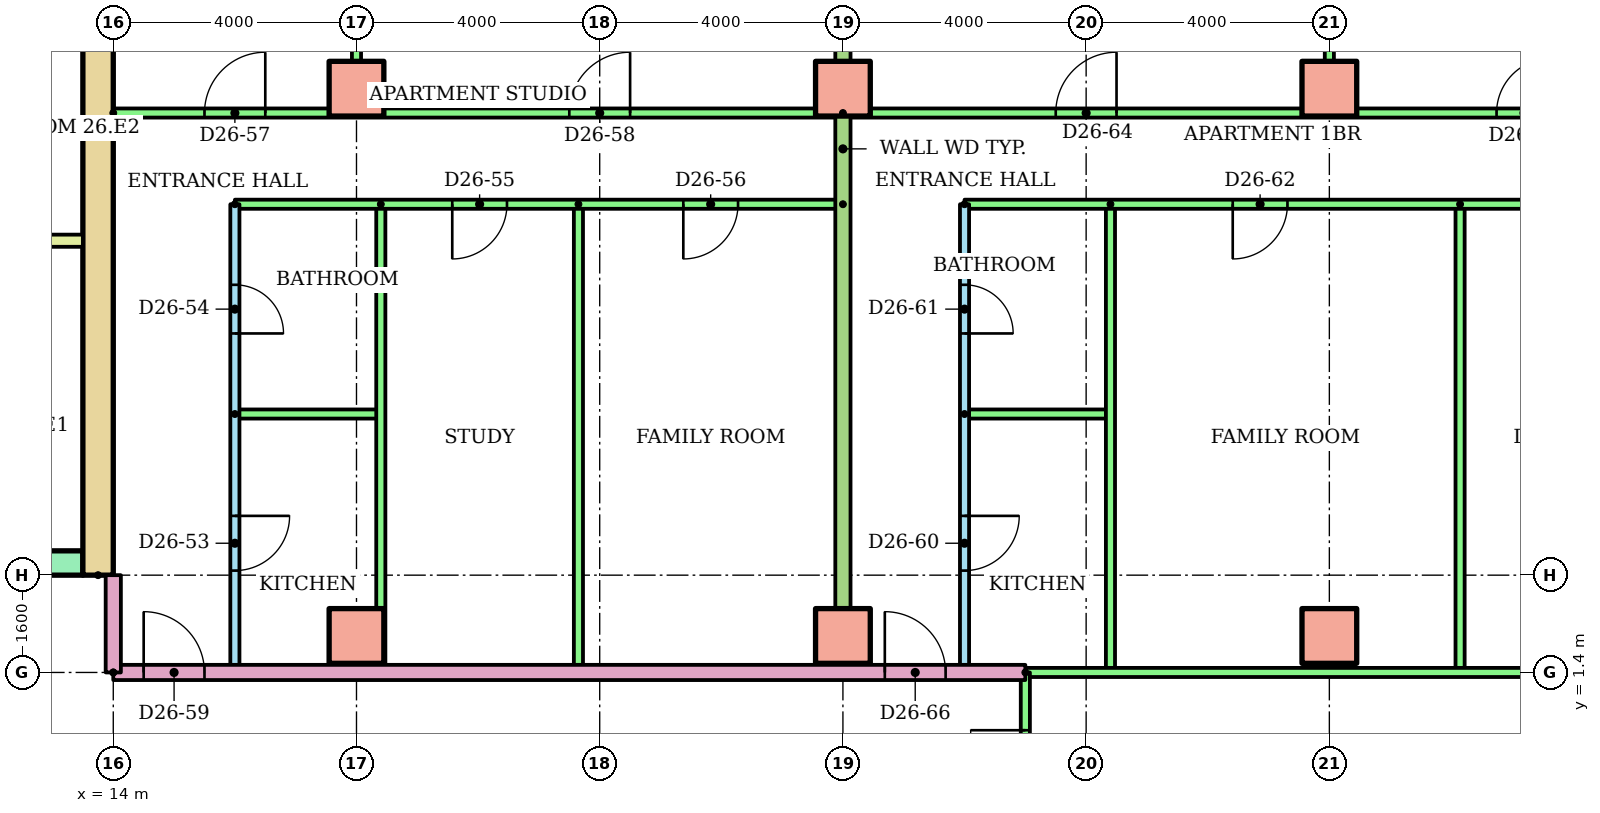
"""IFC4 building model, lengths in metres.
Left out: names, types, materials, properties, quantities, classifications, styles, units other than length and angle.
Written with IfcOpenShell. Run it as: python <this file> out.ifc"""

import sys

from ifc_helpers import new_model, si_unit, direction, frame, frame_2d, origin, origin_2d, place, context, subcontext, project, spatial, rectangle, extrude, element, fill, save


model = new_model("IFC4")
c1 = context("Model", 3, precision=1e-05, world=origin(), true_north=direction((0.0, 1.0)))
c2 = subcontext(c1, "Body", "Model", "MODEL_VIEW")
j1 = project(units=[si_unit("LENGTHUNIT", "METRE"), si_unit("PLANEANGLEUNIT", "RADIAN")], contexts=[c1])
p1 = place(None, origin())
s1 = spatial("IfcSite", under=j1, at=p1, CompositionType="ELEMENT")
p2 = place(p1, origin())
s2 = spatial("IfcBuilding", under=s1, at=p2, CompositionType="ELEMENT")
p3 = place(p2, frame((0.0, 0.0, 99.9)))
s3 = spatial("IfcBuildingStorey", under=s2, at=p3, CompositionType="ELEMENT", Elevation=99.9)
for number, where in (
    (1, (18.0, 2.0, 0.0)),
    (2, (26.0, 2.0, 0.0)),
    (3, (34.0, 2.0, 0.0)),
    (4, (18.0, 11.0, 0.0)),
    (5, (26.0, 11.0, 0.0)),
    (6, (34.0, 11.0, 0.0)),
):
    element("IfcColumn", number, at=place(p3, frame(where)), inside=s3, PredefinedType="COLUMN", context=c2, shape_type="SweptSolid", body=[
        extrude(rectangle(XDim=0.9, YDim=0.9, at=origin_2d()), origin(), (0.0, 0.0, 1.0), 3.2),
    ])
p4 = place(p3, frame((13.75, 3.0, 0.0), z_axis=(0.0, 0.0, 1.0), x_axis=(0.0, 1.0, 0.0)))
e7 = element("IfcWall", 7, at=p4, inside=s3, PredefinedType="SHEAR", context=c2, shape_type="SweptSolid", body=[
    extrude(rectangle(XDim=17.0, YDim=0.5, at=frame_2d((8.5, 0.0))), origin(), (0.0, 0.0, 1.0), 2.92),
])
p5 = place(p3, frame((-13.5, 3.2, 0.0)))
e8 = element("IfcWall", 8, at=p5, inside=s3, PredefinedType="SHEAR", context=c2, shape_type="SweptSolid", body=[
    extrude(rectangle(XDim=27.0, YDim=0.4, at=frame_2d((13.5, 0.0))), origin(), (0.0, 0.0, 1.0), 2.92),
])
p6 = place(p5, frame((6.861, 0.0, 0.0)))
e9 = element("IfcOpeningElement", 9, at=p6, cuts=e8, PredefinedType="OPENING", context=c2, shape_type="SweptSolid", body=[
    extrude(rectangle(XDim=1.1, YDim=2.1, at=frame_2d((0.55, 1.05))), frame((0.0, 0.21, 0.0), z_axis=(0.0, -1.0, 0.0), x_axis=(1.0, 0.0, 0.0)), (0.0, 0.0, 1.0), 0.42),
])
p7 = place(p5, frame((9.906, 0.0, 0.0)))
e10 = element("IfcOpeningElement", 10, at=p7, cuts=e8, PredefinedType="OPENING", context=c2, shape_type="SweptSolid", body=[
    extrude(rectangle(XDim=1.1, YDim=2.1, at=frame_2d((0.55, 1.05))), frame((0.0, 0.21, 0.0), z_axis=(0.0, -1.0, 0.0), x_axis=(1.0, 0.0, 0.0)), (0.0, 0.0, 1.0), 0.42),
])
p8 = place(p5, frame((15.994, 0.0, 0.0)))
e11 = element("IfcOpeningElement", 11, at=p8, cuts=e8, PredefinedType="OPENING", context=c2, shape_type="SweptSolid", body=[
    extrude(rectangle(XDim=1.1, YDim=2.1, at=frame_2d((0.55, 1.05))), frame((0.0, 0.21, 0.0), z_axis=(0.0, -1.0, 0.0), x_axis=(1.0, 0.0, 0.0)), (0.0, 0.0, 1.0), 0.42),
])
p9 = place(p5, frame((19.039, 0.0, 0.0)))
e12 = element("IfcOpeningElement", 12, at=p9, cuts=e8, PredefinedType="OPENING", context=c2, shape_type="SweptSolid", body=[
    extrude(rectangle(XDim=1.1, YDim=2.1, at=frame_2d((0.55, 1.05))), frame((0.0, 0.21, 0.0), z_axis=(0.0, -1.0, 0.0), x_axis=(1.0, 0.0, 0.0)), (0.0, 0.0, 1.0), 0.42),
])
p10 = place(p5, frame((12.6, 0.0, 0.0)))
e13 = element("IfcOpeningElement", 13, at=p10, cuts=e8, PredefinedType="OPENING", context=c2, shape_type="SweptSolid", body=[
    extrude(rectangle(XDim=1.8, YDim=2.1, at=frame_2d((0.9, 1.05))), frame((0.0, 0.21, 0.0), z_axis=(0.0, -1.0, 0.0), x_axis=(1.0, 0.0, 0.0)), (0.0, 0.0, 1.0), 0.42),
])
p11 = place(p3, frame((9.6, 8.5, 0.0)))
e14 = element("IfcWall", 14, at=p11, inside=s3, PredefinedType="PARTITIONING", context=c2, shape_type="SweptSolid", body=[
    extrude(rectangle(XDim=3.9, YDim=0.2, at=frame_2d((1.95, 0.0))), origin(), (0.0, 0.0, 1.0), 2.92),
])
p12 = place(p3, frame((16.0, 9.1, 0.0), z_axis=(0.0, 0.0, 1.0), x_axis=(0.0, -1.0, 0.0)))
e15 = element("IfcWall", 15, at=p12, inside=s3, PredefinedType="PARTITIONING", context=c2, shape_type="SweptSolid", body=[
    extrude(rectangle(XDim=7.7, YDim=0.15, at=frame_2d((3.85, 0.0))), origin(), (0.0, 0.0, 1.0), 2.4),
])
p13 = place(p12, frame((5.125, 0.0, 0.0)))
e16 = element("IfcOpeningElement", 16, at=p13, cuts=e15, PredefinedType="OPENING", context=c2, shape_type="SweptSolid", body=[
    extrude(rectangle(XDim=0.9, YDim=2.1, at=frame_2d((0.45, 1.05))), frame((0.0, 0.085, 0.0), z_axis=(0.0, -1.0, 0.0), x_axis=(1.0, 0.0, 0.0)), (0.0, 0.0, 1.0), 0.17),
])
p14 = place(p12, frame((1.325, 0.0, 0.0)))
e17 = element("IfcOpeningElement", 17, at=p14, cuts=e15, PredefinedType="OPENING", context=c2, shape_type="SweptSolid", body=[
    extrude(rectangle(XDim=0.8, YDim=2.1, at=frame_2d((0.4, 1.05))), frame((0.0, 0.085, 0.0), z_axis=(0.0, -1.0, 0.0), x_axis=(1.0, 0.0, 0.0)), (0.0, 0.0, 1.0), 0.17),
])
p15 = place(p3, frame((16.0, 5.65, 0.0)))
e18 = element("IfcWall", 18, at=p15, inside=s3, PredefinedType="PARTITIONING", context=c2, shape_type="SweptSolid", body=[
    extrude(rectangle(XDim=2.4, YDim=0.15, at=frame_2d((1.2, 0.0))), origin(), (0.0, 0.0, 1.0), 2.4),
])
for number, where, z_axis, x_axis in (
    (19, (18.4, 9.1, 0.0), (0.0, 0.0, 1.0), (0.0, -1.0, 0.0)),
    (20, (21.65, 9.1, 0.0), (0.0, 0.0, 1.0), (0.0, -1.0, 0.0)),
):
    element("IfcWall", number, at=place(p3, frame(where, z_axis=z_axis, x_axis=x_axis)), inside=s3, PredefinedType="PARTITIONING", context=c2, shape_type="SweptSolid", body=[
        extrude(rectangle(XDim=7.7, YDim=0.15, at=frame_2d((3.85, 0.0))), origin(), (0.0, 0.0, 1.0), 2.4),
    ])
p16 = place(p3, frame((26.0, 9.1, 0.0), z_axis=(0.0, 0.0, 1.0), x_axis=(-1.0, 0.0, 0.0)))
e21 = element("IfcWall", 21, at=p16, inside=s3, PredefinedType="PARTITIONING", context=c2, shape_type="SweptSolid", body=[
    extrude(rectangle(XDim=10.0, YDim=0.15, at=frame_2d((5.0, 0.0))), origin(), (0.0, 0.0, 1.0), 2.4),
])
p17 = place(p16, frame((5.525, 0.0, 0.0)))
e22 = element("IfcOpeningElement", 22, at=p17, cuts=e21, PredefinedType="OPENING", context=c2, shape_type="SweptSolid", body=[
    extrude(rectangle(XDim=0.9, YDim=2.1, at=frame_2d((0.45, 1.05))), frame((0.0, 0.085, 0.0), z_axis=(0.0, -1.0, 0.0), x_axis=(1.0, 0.0, 0.0)), (0.0, 0.0, 1.0), 0.17),
])
p18 = place(p16, frame((1.725, 0.0, 0.0)))
e23 = element("IfcOpeningElement", 23, at=p18, cuts=e21, PredefinedType="OPENING", context=c2, shape_type="SweptSolid", body=[
    extrude(rectangle(XDim=0.9, YDim=2.1, at=frame_2d((0.45, 1.05))), frame((0.0, 0.085, 0.0), z_axis=(0.0, -1.0, 0.0), x_axis=(1.0, 0.0, 0.0)), (0.0, 0.0, 1.0), 0.17),
])
p19 = place(p3, frame((14.0, 10.6, 0.0)))
e24 = element("IfcWall", 24, at=p19, inside=s3, PredefinedType="PARTITIONING", context=c2, shape_type="SweptSolid", body=[
    extrude(rectangle(XDim=12.0, YDim=0.15, at=frame_2d((6.0, 0.0))), origin(), (0.0, 0.0, 1.0), 2.4),
])
p20 = place(p19, frame((1.5, 0.0, 0.0)))
e25 = element("IfcOpeningElement", 25, at=p20, cuts=e24, PredefinedType="OPENING", context=c2, shape_type="SweptSolid", body=[
    extrude(rectangle(XDim=1.0, YDim=2.1, at=frame_2d((0.5, 1.05))), frame((0.0, 0.085, 0.0), z_axis=(0.0, -1.0, 0.0), x_axis=(1.0, 0.0, 0.0)), (0.0, 0.0, 1.0), 0.17),
])
p21 = place(p19, frame((7.5, 0.0, 0.0)))
e26 = element("IfcOpeningElement", 26, at=p21, cuts=e24, PredefinedType="OPENING", context=c2, shape_type="SweptSolid", body=[
    extrude(rectangle(XDim=1.0, YDim=2.1, at=frame_2d((0.5, 1.05))), frame((0.0, 0.085, 0.0), z_axis=(0.0, -1.0, 0.0), x_axis=(1.0, 0.0, 0.0)), (0.0, 0.0, 1.0), 0.17),
])
p22 = place(p3, frame((18.0, 18.621, 0.0), z_axis=(0.0, 0.0, 1.0), x_axis=(0.0, -1.0, 0.0)))
e27 = element("IfcWall", 27, at=p22, inside=s3, PredefinedType="PARTITIONING", context=c2, shape_type="SweptSolid", body=[
    extrude(rectangle(XDim=8.021, YDim=0.15, at=frame_2d((4.01, 0.0))), origin(), (0.0, 0.0, 1.0), 2.4),
])
p23 = place(p3, frame((28.0, 9.1, 0.0), z_axis=(0.0, 0.0, 1.0), x_axis=(0.0, -1.0, 0.0)))
e28 = element("IfcWall", 28, at=p23, inside=s3, PredefinedType="PARTITIONING", context=c2, shape_type="SweptSolid", body=[
    extrude(rectangle(XDim=7.7, YDim=0.15, at=frame_2d((3.85, 0.0))), origin(), (0.0, 0.0, 1.0), 2.4),
])
p24 = place(p23, frame((5.125, 0.0, 0.0)))
e29 = element("IfcOpeningElement", 29, at=p24, cuts=e28, PredefinedType="OPENING", context=c2, shape_type="SweptSolid", body=[
    extrude(rectangle(XDim=0.9, YDim=2.1, at=frame_2d((0.45, 1.05))), frame((0.0, 0.085, 0.0), z_axis=(0.0, -1.0, 0.0), x_axis=(1.0, 0.0, 0.0)), (0.0, 0.0, 1.0), 0.17),
])
p25 = place(p23, frame((1.325, 0.0, 0.0)))
e30 = element("IfcOpeningElement", 30, at=p25, cuts=e28, PredefinedType="OPENING", context=c2, shape_type="SweptSolid", body=[
    extrude(rectangle(XDim=0.8, YDim=2.1, at=frame_2d((0.4, 1.05))), frame((0.0, 0.085, 0.0), z_axis=(0.0, -1.0, 0.0), x_axis=(1.0, 0.0, 0.0)), (0.0, 0.0, 1.0), 0.17),
])
p26 = place(p3, frame((28.0, 5.65, 0.0)))
e31 = element("IfcWall", 31, at=p26, inside=s3, PredefinedType="PARTITIONING", context=c2, shape_type="SweptSolid", body=[
    extrude(rectangle(XDim=2.4, YDim=0.15, at=frame_2d((1.2, 0.0))), origin(), (0.0, 0.0, 1.0), 2.4),
])
for number, where, z_axis, x_axis in (
    (32, (30.4, 9.1, 0.0), (0.0, 0.0, 1.0), (0.0, -1.0, 0.0)),
    (33, (36.15, 9.1, 0.0), (0.0, 0.0, 1.0), (0.0, -1.0, 0.0)),
):
    element("IfcWall", number, at=place(p3, frame(where, z_axis=z_axis, x_axis=x_axis)), inside=s3, PredefinedType="PARTITIONING", context=c2, shape_type="SweptSolid", body=[
        extrude(rectangle(XDim=7.7, YDim=0.15, at=frame_2d((3.85, 0.0))), origin(), (0.0, 0.0, 1.0), 2.4),
    ])
p27 = place(p3, frame((40.61, 9.1, 0.0), z_axis=(0.0, 0.0, 1.0), x_axis=(-1.0, 0.0, 0.0)))
e34 = element("IfcWall", 34, at=p27, inside=s3, PredefinedType="PARTITIONING", context=c2, shape_type="SweptSolid", body=[
    extrude(rectangle(XDim=12.61, YDim=0.15, at=frame_2d((6.305, 0.0))), origin(), (0.0, 0.0, 1.0), 2.4),
])
p28 = place(p27, frame((7.299, 0.0, 0.0)))
e35 = element("IfcOpeningElement", 35, at=p28, cuts=e34, PredefinedType="OPENING", context=c2, shape_type="SweptSolid", body=[
    extrude(rectangle(XDim=0.9, YDim=2.1, at=frame_2d((0.45, 1.05))), frame((0.0, 0.085, 0.0), z_axis=(0.0, -1.0, 0.0), x_axis=(1.0, 0.0, 0.0)), (0.0, 0.0, 1.0), 0.17),
])
p29 = place(p27, frame((1.885, 0.0, 0.0)))
e36 = element("IfcOpeningElement", 36, at=p29, cuts=e34, PredefinedType="OPENING", context=c2, shape_type="SweptSolid", body=[
    extrude(rectangle(XDim=0.9, YDim=2.1, at=frame_2d((0.45, 1.05))), frame((0.0, 0.085, 0.0), z_axis=(0.0, -1.0, 0.0), x_axis=(1.0, 0.0, 0.0)), (0.0, 0.0, 1.0), 0.17),
])
p30 = place(p3, frame((26.0, 10.6, 0.0)))
e37 = element("IfcWall", 37, at=p30, inside=s3, PredefinedType="PARTITIONING", context=c2, shape_type="SweptSolid", body=[
    extrude(rectangle(XDim=14.61, YDim=0.15, at=frame_2d((7.305, 0.0))), origin(), (0.0, 0.0, 1.0), 2.4),
])
p31 = place(p30, frame((3.5, 0.0, 0.0)))
e38 = element("IfcOpeningElement", 38, at=p31, cuts=e37, PredefinedType="OPENING", context=c2, shape_type="SweptSolid", body=[
    extrude(rectangle(XDim=1.0, YDim=2.1, at=frame_2d((0.5, 1.05))), frame((0.0, 0.085, 0.0), z_axis=(0.0, -1.0, 0.0), x_axis=(1.0, 0.0, 0.0)), (0.0, 0.0, 1.0), 0.17),
])
p32 = place(p30, frame((10.75, 0.0, 0.0)))
e39 = element("IfcOpeningElement", 39, at=p32, cuts=e37, PredefinedType="OPENING", context=c2, shape_type="SweptSolid", body=[
    extrude(rectangle(XDim=0.9, YDim=2.1, at=frame_2d((0.45, 1.05))), frame((0.0, 0.085, 0.0), z_axis=(0.0, -1.0, 0.0), x_axis=(1.0, 0.0, 0.0)), (0.0, 0.0, 1.0), 0.17),
])
p33 = place(p3, frame((34.0, 18.621, 0.0), z_axis=(0.0, 0.0, 1.0), x_axis=(0.0, -1.0, 0.0)))
e40 = element("IfcWall", 40, at=p33, inside=s3, PredefinedType="PARTITIONING", context=c2, shape_type="SweptSolid", body=[
    extrude(rectangle(XDim=8.021, YDim=0.15, at=frame_2d((4.01, 0.0))), origin(), (0.0, 0.0, 1.0), 2.4),
])
p34 = place(p3, frame((26.0, 18.621, 0.0), z_axis=(0.0, 0.0, 1.0), x_axis=(0.0, -1.0, 0.0)))
e41 = element("IfcWall", 41, at=p34, inside=s3, PredefinedType="PARTITIONING", context=c2, shape_type="SweptSolid", body=[
    extrude(rectangle(XDim=17.221, YDim=0.25, at=frame_2d((8.611, 0.0))), origin(), (0.0, 0.0, 1.0), 2.4),
])
p35 = place(p3, frame((14.0, 1.4, 0.0)))
e42 = element("IfcWall", 42, at=p35, inside=s3, PredefinedType="PARTITIONING", context=c2, shape_type="SweptSolid", body=[
    extrude(rectangle(XDim=15.0, YDim=0.25, at=frame_2d((7.5, 0.0))), origin(), (0.0, 0.0, 1.0), 2.4),
])
p36 = place(p35, frame((0.5, 0.0, 0.0)))
e43 = element("IfcOpeningElement", 43, at=p36, cuts=e42, PredefinedType="OPENING", context=c2, shape_type="SweptSolid", body=[
    extrude(rectangle(XDim=1.0, YDim=2.1, at=frame_2d((0.5, 1.05))), frame((0.0, 0.135, 0.0), z_axis=(0.0, -1.0, 0.0), x_axis=(1.0, 0.0, 0.0)), (0.0, 0.0, 1.0), 0.27),
])
p37 = place(p35, frame((12.689, 0.0, 0.0)))
e44 = element("IfcOpeningElement", 44, at=p37, cuts=e42, PredefinedType="OPENING", context=c2, shape_type="SweptSolid", body=[
    extrude(rectangle(XDim=1.0, YDim=2.1, at=frame_2d((0.5, 1.05))), frame((0.0, 0.135, 0.0), z_axis=(0.0, -1.0, 0.0), x_axis=(1.0, 0.0, 0.0)), (0.0, 0.0, 1.0), 0.27),
])
p38 = place(p3, frame((29.0, 1.4, 0.0)))
e45 = element("IfcWall", 45, at=p38, inside=s3, PredefinedType="PARTITIONING", context=c2, shape_type="SweptSolid", body=[
    extrude(rectangle(XDim=11.62, YDim=0.15, at=frame_2d((5.81, 0.0))), origin(), (0.0, 0.0, 1.0), 2.4),
])
p39 = place(p3, frame((29.0, -1.4, 0.0), z_axis=(0.0, 0.0, 1.0), x_axis=(0.0, 1.0, 0.0)))
e46 = element("IfcWall", 46, at=p39, inside=s3, PredefinedType="PARTITIONING", context=c2, shape_type="SweptSolid", body=[
    extrude(rectangle(XDim=2.8, YDim=0.15, at=frame_2d((1.4, 0.0))), origin(), (0.0, 0.0, 1.0), 2.4),
])
p40 = place(p39, frame((0.95, 0.0, 0.0)))
e47 = element("IfcOpeningElement", 47, at=p40, cuts=e46, PredefinedType="OPENING", context=c2, shape_type="SweptSolid", body=[
    extrude(rectangle(XDim=0.9, YDim=2.1, at=frame_2d((0.45, 1.05))), frame((0.0, 0.085, 0.0), z_axis=(0.0, -1.0, 0.0), x_axis=(1.0, 0.0, 0.0)), (0.0, 0.0, 1.0), 0.17),
])
p41 = place(p3, frame((14.0, 1.4, 0.0), z_axis=(0.0, 0.0, 1.0), x_axis=(0.0, 1.0, 0.0)))
e48 = element("IfcWall", 48, at=p41, inside=s3, PredefinedType="PARTITIONING", context=c2, shape_type="SweptSolid", body=[
    extrude(rectangle(XDim=1.6, YDim=0.25, at=frame_2d((0.8, 0.0))), origin(), (0.0, 0.0, 1.0), 2.4),
])
p42 = place(p13, origin())
e49 = element("IfcDoor", 49, at=p42, inside=s3, OperationType="SINGLE_SWING_LEFT", PredefinedType="DOOR", context=c2, shape_type="SweptSolid", body=[
    extrude(rectangle(XDim=0.9, YDim=2.1, at=frame_2d((0.45, 1.05))), frame((0.0, 0.025, 0.0), z_axis=(0.0, -1.0, 0.0), x_axis=(1.0, 0.0, 0.0)), (0.0, 0.0, 1.0), 0.05),
])
fill(e16, e49)
p43 = place(p14, origin())
e50 = element("IfcDoor", 50, at=p43, inside=s3, OperationType="SINGLE_SWING_RIGHT", PredefinedType="DOOR", context=c2, shape_type="SweptSolid", body=[
    extrude(rectangle(XDim=0.8, YDim=2.1, at=frame_2d((0.4, 1.05))), frame((0.0, 0.025, 0.0), z_axis=(0.0, -1.0, 0.0), x_axis=(1.0, 0.0, 0.0)), (0.0, 0.0, 1.0), 0.05),
])
fill(e17, e50)
p44 = place(p17, origin())
e51 = element("IfcDoor", 51, at=p44, inside=s3, OperationType="SINGLE_SWING_RIGHT", PredefinedType="DOOR", context=c2, shape_type="SweptSolid", body=[
    extrude(rectangle(XDim=0.9, YDim=2.1, at=frame_2d((0.45, 1.05))), frame((0.0, 0.025, 0.0), z_axis=(0.0, -1.0, 0.0), x_axis=(1.0, 0.0, 0.0)), (0.0, 0.0, 1.0), 0.05),
])
fill(e22, e51)
p45 = place(p18, origin())
e52 = element("IfcDoor", 52, at=p45, inside=s3, OperationType="SINGLE_SWING_RIGHT", PredefinedType="DOOR", context=c2, shape_type="SweptSolid", body=[
    extrude(rectangle(XDim=0.9, YDim=2.1, at=frame_2d((0.45, 1.05))), frame((0.0, 0.025, 0.0), z_axis=(0.0, -1.0, 0.0), x_axis=(1.0, 0.0, 0.0)), (0.0, 0.0, 1.0), 0.05),
])
fill(e23, e52)
p46 = place(p20, origin())
e53 = element("IfcDoor", 53, at=p46, inside=s3, OperationType="SINGLE_SWING_RIGHT", PredefinedType="DOOR", context=c2, shape_type="SweptSolid", body=[
    extrude(rectangle(XDim=1.0, YDim=2.1, at=frame_2d((0.5, 1.05))), frame((0.0, 0.025, 0.0), z_axis=(0.0, -1.0, 0.0), x_axis=(1.0, 0.0, 0.0)), (0.0, 0.0, 1.0), 0.05),
])
fill(e25, e53)
p47 = place(p21, origin())
e54 = element("IfcDoor", 54, at=p47, inside=s3, OperationType="SINGLE_SWING_RIGHT", PredefinedType="DOOR", context=c2, shape_type="SweptSolid", body=[
    extrude(rectangle(XDim=1.0, YDim=2.1, at=frame_2d((0.5, 1.05))), frame((0.0, 0.025, 0.0), z_axis=(0.0, -1.0, 0.0), x_axis=(1.0, 0.0, 0.0)), (0.0, 0.0, 1.0), 0.05),
])
fill(e26, e54)
p48 = place(p36, origin())
e55 = element("IfcDoor", 55, at=p48, inside=s3, OperationType="SINGLE_SWING_LEFT", PredefinedType="DOOR", context=c2, shape_type="SweptSolid", body=[
    extrude(rectangle(XDim=1.0, YDim=2.1, at=frame_2d((0.5, 1.05))), frame((0.0, 0.025, 0.0), z_axis=(0.0, -1.0, 0.0), x_axis=(1.0, 0.0, 0.0)), (0.0, 0.0, 1.0), 0.05),
])
fill(e43, e55)
p49 = place(p24, origin())
e56 = element("IfcDoor", 56, at=p49, inside=s3, OperationType="SINGLE_SWING_LEFT", PredefinedType="DOOR", context=c2, shape_type="SweptSolid", body=[
    extrude(rectangle(XDim=0.9, YDim=2.1, at=frame_2d((0.45, 1.05))), frame((0.0, 0.025, 0.0), z_axis=(0.0, -1.0, 0.0), x_axis=(1.0, 0.0, 0.0)), (0.0, 0.0, 1.0), 0.05),
])
fill(e29, e56)
p50 = place(p25, origin())
e57 = element("IfcDoor", 57, at=p50, inside=s3, OperationType="SINGLE_SWING_RIGHT", PredefinedType="DOOR", context=c2, shape_type="SweptSolid", body=[
    extrude(rectangle(XDim=0.8, YDim=2.1, at=frame_2d((0.4, 1.05))), frame((0.0, 0.025, 0.0), z_axis=(0.0, -1.0, 0.0), x_axis=(1.0, 0.0, 0.0)), (0.0, 0.0, 1.0), 0.05),
])
fill(e30, e57)
p51 = place(p28, origin())
e58 = element("IfcDoor", 58, at=p51, inside=s3, OperationType="SINGLE_SWING_RIGHT", PredefinedType="DOOR", context=c2, shape_type="SweptSolid", body=[
    extrude(rectangle(XDim=0.9, YDim=2.1, at=frame_2d((0.45, 1.05))), frame((0.0, 0.025, 0.0), z_axis=(0.0, -1.0, 0.0), x_axis=(1.0, 0.0, 0.0)), (0.0, 0.0, 1.0), 0.05),
])
fill(e35, e58)
p52 = place(p31, origin())
e59 = element("IfcDoor", 59, at=p52, inside=s3, OperationType="SINGLE_SWING_RIGHT", PredefinedType="DOOR", context=c2, shape_type="SweptSolid", body=[
    extrude(rectangle(XDim=1.0, YDim=2.1, at=frame_2d((0.5, 1.05))), frame((0.0, 0.025, 0.0), z_axis=(0.0, -1.0, 0.0), x_axis=(1.0, 0.0, 0.0)), (0.0, 0.0, 1.0), 0.05),
])
fill(e38, e59)
p53 = place(p32, origin())
e60 = element("IfcDoor", 60, at=p53, inside=s3, OperationType="SINGLE_SWING_RIGHT", PredefinedType="DOOR", context=c2, shape_type="SweptSolid", body=[
    extrude(rectangle(XDim=0.9, YDim=2.1, at=frame_2d((0.45, 1.05))), frame((0.0, 0.025, 0.0), z_axis=(0.0, -1.0, 0.0), x_axis=(1.0, 0.0, 0.0)), (0.0, 0.0, 1.0), 0.05),
])
fill(e39, e60)
p54 = place(p37, origin())
e61 = element("IfcDoor", 61, at=p54, inside=s3, OperationType="SINGLE_SWING_LEFT", PredefinedType="DOOR", context=c2, shape_type="SweptSolid", body=[
    extrude(rectangle(XDim=1.0, YDim=2.1, at=frame_2d((0.5, 1.05))), frame((0.0, 0.025, 0.0), z_axis=(0.0, -1.0, 0.0), x_axis=(1.0, 0.0, 0.0)), (0.0, 0.0, 1.0), 0.05),
])
fill(e44, e61)
p55 = place(p40, origin())
e62 = element("IfcDoor", 62, at=p55, inside=s3, OperationType="SINGLE_SWING_RIGHT", PredefinedType="DOOR", context=c2, shape_type="SweptSolid", body=[
    extrude(rectangle(XDim=0.9, YDim=2.1, at=frame_2d((0.45, 1.05))), frame((0.0, 0.025, 0.0), z_axis=(0.0, -1.0, 0.0), x_axis=(1.0, 0.0, 0.0)), (0.0, 0.0, 1.0), 0.05),
])
fill(e47, e62)
save(model, sys.argv[1])
